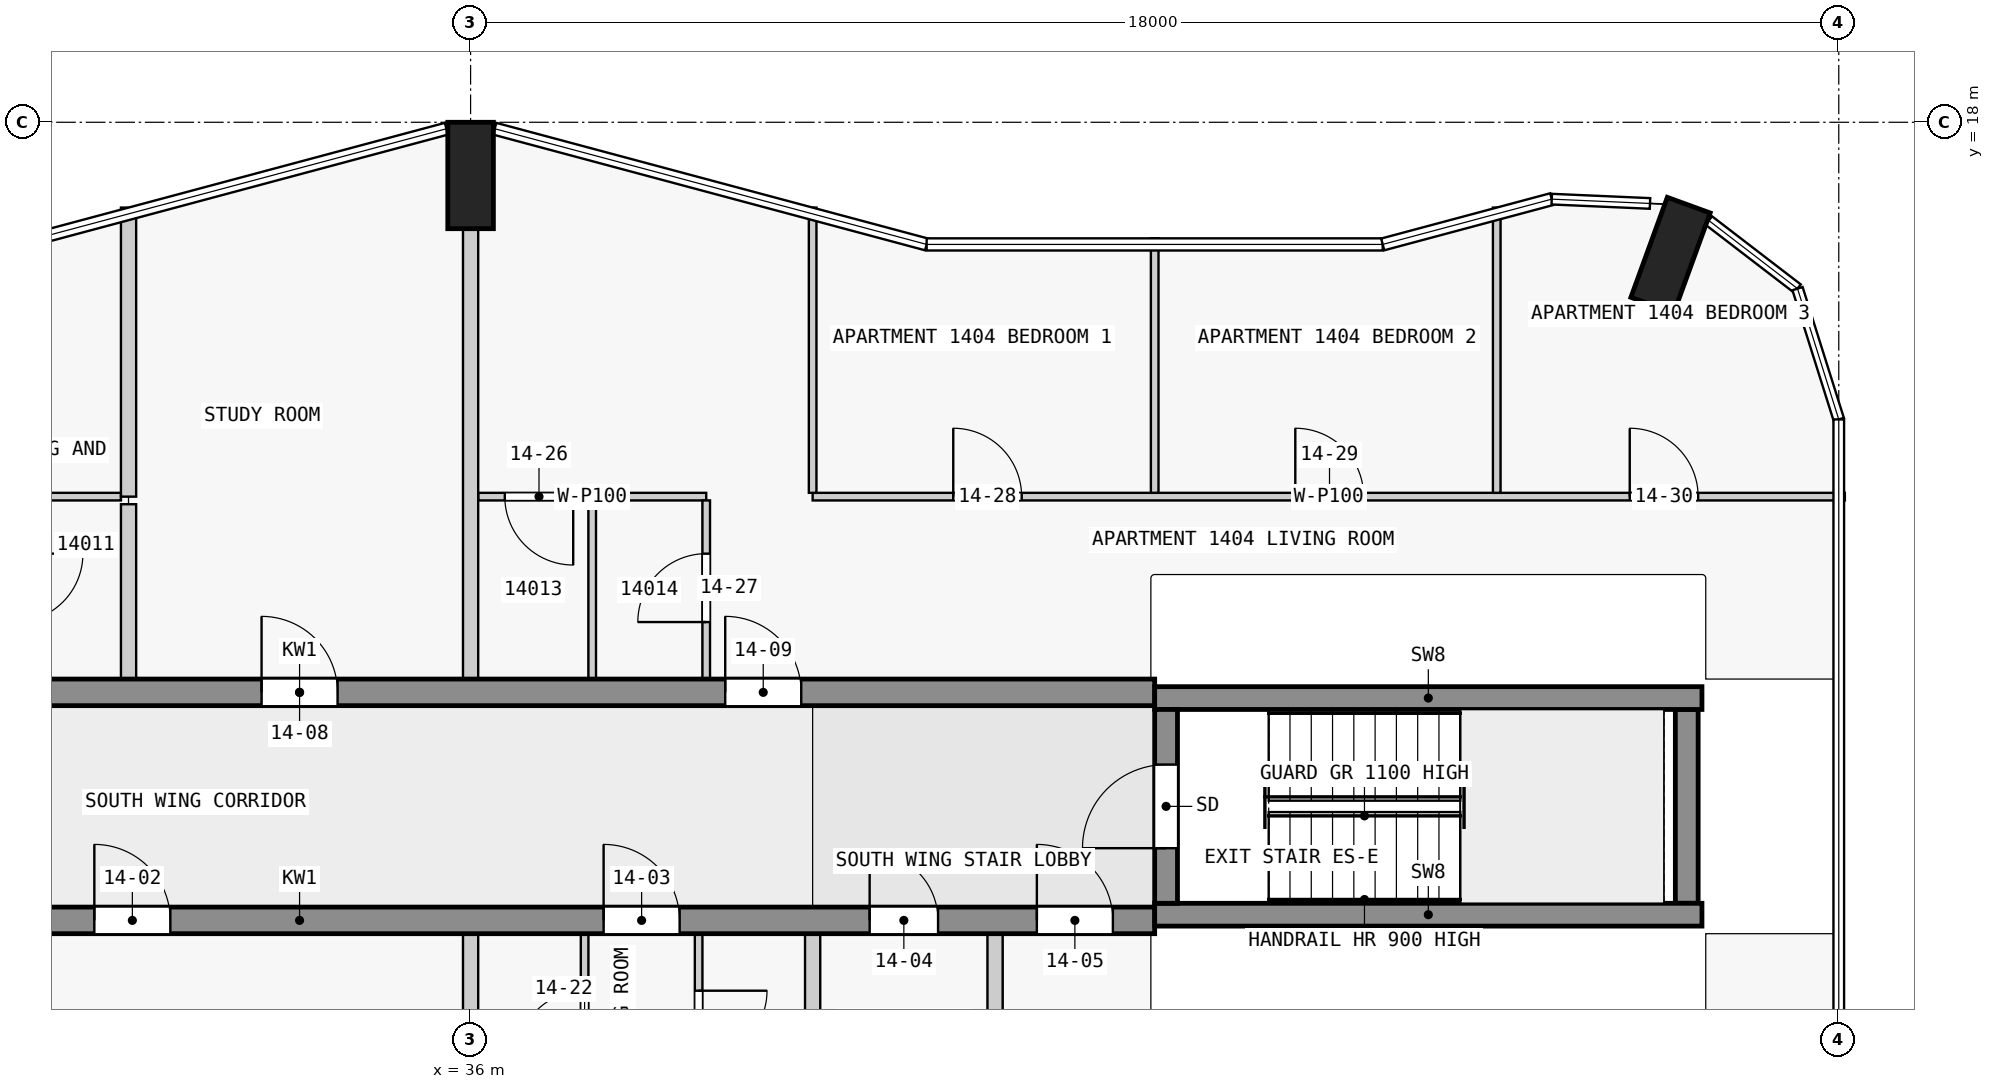
"""IFC4 building model, lengths in metres.
Left out: names, types, materials, properties, quantities, classifications, styles, units other than length and angle.
Written with IfcOpenShell. Run it as: python <this file> out.ifc"""

import sys

from ifc_helpers import new_model, si_unit, direction, frame, frame_2d, origin, origin_2d, place, context, subcontext, project, spatial, rectangle, extrude, element, fill, save


model = new_model("IFC4")
c1 = context("Model", 3, precision=1e-05, world=origin(), true_north=direction((0.0, 1.0)))
c2 = subcontext(c1, "Body", "Model", "MODEL_VIEW")
j1 = project(units=[si_unit("LENGTHUNIT", "METRE"), si_unit("PLANEANGLEUNIT", "RADIAN")], contexts=[c1])
p1 = place(None, origin())
s1 = spatial("IfcSite", under=j1, at=p1, CompositionType="ELEMENT")
p2 = place(p1, origin())
s2 = spatial("IfcBuilding", under=s1, at=p2, CompositionType="ELEMENT")
p3 = place(p2, frame((0.0, 0.0, 58.3)))
s3 = spatial("IfcBuildingStorey", under=s2, at=p3, CompositionType="ELEMENT", Elevation=58.3)
for number, where, z_axis, x_axis in (
    (1, (51.787, 16.252, 0.0), (0.0, 0.0, 1.0), (-0.94, 0.342, 0.0)),
    (2, (36.0, 17.3, 0.0), (0.0, 0.0, 1.0), (1.0, 0.0, 0.0)),
):
    element("IfcColumn", number, at=place(p3, frame(where, z_axis=z_axis, x_axis=x_axis)), inside=s3, PredefinedType="COLUMN", context=c2, shape_type="SweptSolid", body=[
        extrude(rectangle(XDim=0.6, YDim=1.4, at=origin_2d()), origin(), (0.0, 0.0, 1.0), 3.5),
    ])
p4 = place(p3, frame((45.15, 7.725, 0.0), z_axis=(0.0, 0.0, 1.0), x_axis=(0.0, 1.0, 0.0)))
e3 = element("IfcWall", 3, at=p4, inside=s3, PredefinedType="SHEAR", context=c2, shape_type="SweptSolid", body=[
    extrude(rectangle(XDim=2.55, YDim=0.3, at=frame_2d((1.275, 0.0))), origin(), (0.0, 0.0, 1.0), 3.5),
])
p5 = place(p4, frame((0.725, 0.0, 0.0)))
e4 = element("IfcOpeningElement", 4, at=p5, cuts=e3, PredefinedType="OPENING", context=c2, shape_type="SweptSolid", body=[
    extrude(rectangle(XDim=1.1, YDim=2.1, at=frame_2d((0.55, 1.05))), frame((0.0, 0.16, 0.0), z_axis=(0.0, -1.0, 0.0), x_axis=(1.0, 0.0, 0.0)), (0.0, 0.0, 1.0), 0.32),
])
p6 = place(p3, frame((52.0, 7.725, 0.0), z_axis=(0.0, 0.0, 1.0), x_axis=(0.0, 1.0, 0.0)))
e5 = element("IfcWall", 5, at=p6, inside=s3, PredefinedType="SHEAR", context=c2, shape_type="SweptSolid", body=[
    extrude(rectangle(XDim=2.55, YDim=0.3, at=frame_2d((1.275, 0.0))), origin(), (0.0, 0.0, 1.0), 3.5),
])
for number, where, z_axis, x_axis in (
    (6, (45.0, 7.575, 0.0), (0.0, 0.0, 1.0), (1.0, 0.0, 0.0)),
    (7, (45.0, 10.425, 0.0), (0.0, 0.0, 1.0), (1.0, 0.0, 0.0)),
):
    element("IfcWall", number, at=place(p3, frame(where, z_axis=z_axis, x_axis=x_axis)), inside=s3, PredefinedType="SHEAR", context=c2, shape_type="SweptSolid", body=[
        extrude(rectangle(XDim=7.2, YDim=0.3, at=frame_2d((3.6, 0.0))), origin(), (0.0, 0.0, 1.0), 3.5),
    ])
p7 = place(p3, frame((22.5, 7.5, 0.0), z_axis=(0.0, 0.0, 1.0), x_axis=(1.0, 0.0, 0.0)))
e8 = element("IfcWall", 8, at=p7, inside=s3, PredefinedType="SHEAR", context=c2, shape_type="SweptSolid", body=[
    extrude(rectangle(XDim=22.5, YDim=0.35, at=frame_2d((11.25, 0.0))), origin(), (0.0, 0.0, 1.0), 3.25),
])
p8 = place(p7, frame((1.75, 0.0, 0.0)))
e9 = element("IfcOpeningElement", 9, at=p8, cuts=e8, PredefinedType="OPENING", context=c2, shape_type="SweptSolid", body=[
    extrude(rectangle(XDim=1.0, YDim=2.1, at=frame_2d((0.5, 1.05))), frame((0.0, 0.185, 0.0), z_axis=(0.0, -1.0, 0.0), x_axis=(1.0, 0.0, 0.0)), (0.0, 0.0, 1.0), 0.37),
])
p9 = place(p7, frame((8.55, 0.0, 0.0)))
e10 = element("IfcOpeningElement", 10, at=p9, cuts=e8, PredefinedType="OPENING", context=c2, shape_type="SweptSolid", body=[
    extrude(rectangle(XDim=1.0, YDim=2.1, at=frame_2d((0.5, 1.05))), frame((0.0, 0.185, 0.0), z_axis=(0.0, -1.0, 0.0), x_axis=(1.0, 0.0, 0.0)), (0.0, 0.0, 1.0), 0.37),
])
p10 = place(p7, frame((15.25, 0.0, 0.0)))
e11 = element("IfcOpeningElement", 11, at=p10, cuts=e8, PredefinedType="OPENING", context=c2, shape_type="SweptSolid", body=[
    extrude(rectangle(XDim=1.0, YDim=2.1, at=frame_2d((0.5, 1.05))), frame((0.0, 0.185, 0.0), z_axis=(0.0, -1.0, 0.0), x_axis=(1.0, 0.0, 0.0)), (0.0, 0.0, 1.0), 0.37),
])
p11 = place(p7, frame((18.75, 0.0, 0.0)))
e12 = element("IfcOpeningElement", 12, at=p11, cuts=e8, PredefinedType="OPENING", context=c2, shape_type="SweptSolid", body=[
    extrude(rectangle(XDim=0.9, YDim=2.1, at=frame_2d((0.45, 1.05))), frame((0.0, 0.185, 0.0), z_axis=(0.0, -1.0, 0.0), x_axis=(1.0, 0.0, 0.0)), (0.0, 0.0, 1.0), 0.37),
])
p12 = place(p7, frame((20.95, 0.0, 0.0)))
e13 = element("IfcOpeningElement", 13, at=p12, cuts=e8, PredefinedType="OPENING", context=c2, shape_type="SweptSolid", body=[
    extrude(rectangle(XDim=1.0, YDim=2.1, at=frame_2d((0.5, 1.05))), frame((0.0, 0.185, 0.0), z_axis=(0.0, -1.0, 0.0), x_axis=(1.0, 0.0, 0.0)), (0.0, 0.0, 1.0), 0.37),
])
p13 = place(p3, frame((22.5, 10.5, 0.0), z_axis=(0.0, 0.0, 1.0), x_axis=(1.0, 0.0, 0.0)))
e14 = element("IfcWall", 14, at=p13, inside=s3, PredefinedType="SHEAR", context=c2, shape_type="SweptSolid", body=[
    extrude(rectangle(XDim=22.5, YDim=0.35, at=frame_2d((11.25, 0.0))), origin(), (0.0, 0.0, 1.0), 3.25),
])
p14 = place(p13, frame((1.75, 0.0, 0.0)))
e15 = element("IfcOpeningElement", 15, at=p14, cuts=e14, PredefinedType="OPENING", context=c2, shape_type="SweptSolid", body=[
    extrude(rectangle(XDim=1.0, YDim=2.1, at=frame_2d((0.5, 1.05))), frame((0.0, 0.185, 0.0), z_axis=(0.0, -1.0, 0.0), x_axis=(1.0, 0.0, 0.0)), (0.0, 0.0, 1.0), 0.37),
])
p15 = place(p13, frame((6.25, 0.0, 0.0)))
e16 = element("IfcOpeningElement", 16, at=p15, cuts=e14, PredefinedType="OPENING", context=c2, shape_type="SweptSolid", body=[
    extrude(rectangle(XDim=1.0, YDim=2.1, at=frame_2d((0.5, 1.05))), frame((0.0, 0.185, 0.0), z_axis=(0.0, -1.0, 0.0), x_axis=(1.0, 0.0, 0.0)), (0.0, 0.0, 1.0), 0.37),
])
p16 = place(p13, frame((10.75, 0.0, 0.0)))
e17 = element("IfcOpeningElement", 17, at=p16, cuts=e14, PredefinedType="OPENING", context=c2, shape_type="SweptSolid", body=[
    extrude(rectangle(XDim=1.0, YDim=2.1, at=frame_2d((0.5, 1.05))), frame((0.0, 0.185, 0.0), z_axis=(0.0, -1.0, 0.0), x_axis=(1.0, 0.0, 0.0)), (0.0, 0.0, 1.0), 0.37),
])
p17 = place(p13, frame((16.85, 0.0, 0.0)))
e18 = element("IfcOpeningElement", 18, at=p17, cuts=e14, PredefinedType="OPENING", context=c2, shape_type="SweptSolid", body=[
    extrude(rectangle(XDim=1.0, YDim=2.1, at=frame_2d((0.5, 1.05))), frame((0.0, 0.185, 0.0), z_axis=(0.0, -1.0, 0.0), x_axis=(1.0, 0.0, 0.0)), (0.0, 0.0, 1.0), 0.37),
])
p18 = place(p3, frame((31.4, 13.075, 0.0), z_axis=(0.0, 0.0, 1.0), x_axis=(-1.0, 0.0, 0.0)))
e19 = element("IfcWall", 19, at=p18, inside=s3, PredefinedType="PARTITIONING", context=c2, shape_type="SweptSolid", body=[
    extrude(rectangle(XDim=1.35, YDim=0.1, at=frame_2d((0.675, 0.0))), origin(), (0.0, 0.0, 1.0), 3.25),
])
p19 = place(p3, frame((39.1, 13.075, 0.0), z_axis=(0.0, 0.0, 1.0), x_axis=(-1.0, 0.0, 0.0)))
e20 = element("IfcWall", 20, at=p19, inside=s3, PredefinedType="PARTITIONING", context=c2, shape_type="SweptSolid", body=[
    extrude(rectangle(XDim=3.0, YDim=0.1, at=frame_2d((1.5, 0.0))), origin(), (0.0, 0.0, 1.0), 3.25),
])
p20 = place(p19, frame((1.75, 0.0, 0.0)))
e21 = element("IfcOpeningElement", 21, at=p20, cuts=e20, PredefinedType="OPENING", context=c2, shape_type="SweptSolid", body=[
    extrude(rectangle(XDim=0.9, YDim=2.1, at=frame_2d((0.45, 1.05))), frame((0.0, 0.06, 0.0), z_axis=(0.0, -1.0, 0.0), x_axis=(1.0, 0.0, 0.0)), (0.0, 0.0, 1.0), 0.12),
])
p21 = place(p3, frame((40.5, 13.075, 0.0), z_axis=(0.0, 0.0, 1.0), x_axis=(1.0, 0.0, 0.0)))
e22 = element("IfcWall", 22, at=p21, inside=s3, PredefinedType="PARTITIONING", context=c2, shape_type="SweptSolid", body=[
    extrude(rectangle(XDim=13.58, YDim=0.1, at=frame_2d((6.79, 0.0))), origin(), (0.0, 0.0, 1.0), 3.25),
])
p22 = place(p21, frame((1.85, 0.0, 0.0)))
e23 = element("IfcOpeningElement", 23, at=p22, cuts=e22, PredefinedType="OPENING", context=c2, shape_type="SweptSolid", body=[
    extrude(rectangle(XDim=0.9, YDim=2.1, at=frame_2d((0.45, 1.05))), frame((0.0, 0.06, 0.0), z_axis=(0.0, -1.0, 0.0), x_axis=(1.0, 0.0, 0.0)), (0.0, 0.0, 1.0), 0.12),
])
p23 = place(p21, frame((6.35, 0.0, 0.0)))
e24 = element("IfcOpeningElement", 24, at=p23, cuts=e22, PredefinedType="OPENING", context=c2, shape_type="SweptSolid", body=[
    extrude(rectangle(XDim=0.9, YDim=2.1, at=frame_2d((0.45, 1.05))), frame((0.0, 0.06, 0.0), z_axis=(0.0, -1.0, 0.0), x_axis=(1.0, 0.0, 0.0)), (0.0, 0.0, 1.0), 0.12),
])
p24 = place(p21, frame((10.75, 0.0, 0.0)))
e25 = element("IfcOpeningElement", 25, at=p24, cuts=e22, PredefinedType="OPENING", context=c2, shape_type="SweptSolid", body=[
    extrude(rectangle(XDim=0.9, YDim=2.1, at=frame_2d((0.45, 1.05))), frame((0.0, 0.06, 0.0), z_axis=(0.0, -1.0, 0.0), x_axis=(1.0, 0.0, 0.0)), (0.0, 0.0, 1.0), 0.12),
])
p25 = place(p3, frame((31.5, 16.878, 0.0), z_axis=(0.0, 0.0, 1.0), x_axis=(0.0, -1.0, 0.0)))
e26 = element("IfcWall", 26, at=p25, inside=s3, PredefinedType="PARTITIONING", context=c2, shape_type="SweptSolid", body=[
    extrude(rectangle(XDim=3.803, YDim=0.2, at=frame_2d((1.901, 0.0))), origin(), (0.0, 0.0, 1.0), 3.25),
])
p26 = place(p3, frame((31.5, 10.675, 0.0), z_axis=(0.0, 0.0, 1.0), x_axis=(0.0, 1.0, 0.0)))
e27 = element("IfcWall", 27, at=p26, inside=s3, PredefinedType="PARTITIONING", context=c2, shape_type="SweptSolid", body=[
    extrude(rectangle(XDim=2.3, YDim=0.2, at=frame_2d((1.15, 0.0))), origin(), (0.0, 0.0, 1.0), 3.25),
])
for number, where, z_axis, x_axis in (
    (28, (36.0, 1.4, 0.0), (0.0, 0.0, 1.0), (0.0, 1.0, 0.0)),
    (29, (36.0, 10.675, 0.0), (0.0, 0.0, 1.0), (0.0, 1.0, 0.0)),
):
    element("IfcWall", number, at=place(p3, frame(where, z_axis=z_axis, x_axis=x_axis)), inside=s3, PredefinedType="PARTITIONING", context=c2, shape_type="SweptSolid", body=[
        extrude(rectangle(XDim=5.925, YDim=0.2, at=frame_2d((2.962, 0.0))), origin(), (0.0, 0.0, 1.0), 3.25),
    ])
p27 = place(p3, frame((37.5, 4.925, 0.0), z_axis=(0.0, 0.0, 1.0), x_axis=(0.0, 1.0, 0.0)))
e30 = element("IfcWall", 30, at=p27, inside=s3, PredefinedType="PARTITIONING", context=c2, shape_type="SweptSolid", body=[
    extrude(rectangle(XDim=2.4, YDim=0.1, at=frame_2d((1.2, 0.0))), origin(), (0.0, 0.0, 1.0), 3.25),
])
p28 = place(p27, frame((0.75, 0.0, 0.0)))
e31 = element("IfcOpeningElement", 31, at=p28, cuts=e30, PredefinedType="OPENING", context=c2, shape_type="SweptSolid", body=[
    extrude(rectangle(XDim=0.9, YDim=2.1, at=frame_2d((0.45, 1.05))), frame((0.0, 0.06, 0.0), z_axis=(0.0, -1.0, 0.0), x_axis=(1.0, 0.0, 0.0)), (0.0, 0.0, 1.0), 0.12),
])
p29 = place(p3, frame((37.6, 10.675, 0.0), z_axis=(0.0, 0.0, 1.0), x_axis=(0.0, 1.0, 0.0)))
e32 = element("IfcWall", 32, at=p29, inside=s3, PredefinedType="PARTITIONING", context=c2, shape_type="SweptSolid", body=[
    extrude(rectangle(XDim=2.35, YDim=0.1, at=frame_2d((1.175, 0.0))), origin(), (0.0, 0.0, 1.0), 3.25),
])
p30 = place(p3, frame((39.0, 7.325, 0.0), z_axis=(0.0, 0.0, 1.0), x_axis=(0.0, -1.0, 0.0)))
e33 = element("IfcWall", 33, at=p30, inside=s3, PredefinedType="PARTITIONING", context=c2, shape_type="SweptSolid", body=[
    extrude(rectangle(XDim=2.4, YDim=0.1, at=frame_2d((1.2, 0.0))), origin(), (0.0, 0.0, 1.0), 3.25),
])
p31 = place(p30, frame((0.75, 0.0, 0.0)))
e34 = element("IfcOpeningElement", 34, at=p31, cuts=e33, PredefinedType="OPENING", context=c2, shape_type="SweptSolid", body=[
    extrude(rectangle(XDim=0.9, YDim=2.1, at=frame_2d((0.45, 1.05))), frame((0.0, 0.06, 0.0), z_axis=(0.0, -1.0, 0.0), x_axis=(1.0, 0.0, 0.0)), (0.0, 0.0, 1.0), 0.12),
])
p32 = place(p3, frame((39.1, 10.675, 0.0), z_axis=(0.0, 0.0, 1.0), x_axis=(0.0, 1.0, 0.0)))
e35 = element("IfcWall", 35, at=p32, inside=s3, PredefinedType="PARTITIONING", context=c2, shape_type="SweptSolid", body=[
    extrude(rectangle(XDim=2.35, YDim=0.1, at=frame_2d((1.175, 0.0))), origin(), (0.0, 0.0, 1.0), 3.25),
])
p33 = place(p32, frame((0.75, 0.0, 0.0)))
e36 = element("IfcOpeningElement", 36, at=p33, cuts=e35, PredefinedType="OPENING", context=c2, shape_type="SweptSolid", body=[
    extrude(rectangle(XDim=0.9, YDim=2.1, at=frame_2d((0.45, 1.05))), frame((0.0, 0.06, 0.0), z_axis=(0.0, -1.0, 0.0), x_axis=(1.0, 0.0, 0.0)), (0.0, 0.0, 1.0), 0.12),
])
p34 = place(p3, frame((40.5, 16.878, 0.0), z_axis=(0.0, 0.0, 1.0), x_axis=(0.0, -1.0, 0.0)))
e37 = element("IfcWall", 37, at=p34, inside=s3, PredefinedType="PARTITIONING", context=c2, shape_type="SweptSolid", body=[
    extrude(rectangle(XDim=3.753, YDim=0.1, at=frame_2d((1.876, 0.0))), origin(), (0.0, 0.0, 1.0), 3.25),
])
for number, where, z_axis, x_axis in (
    (38, (40.5, 5.025, 0.0), (0.0, 0.0, 1.0), (0.0, 1.0, 0.0)),
    (39, (42.9, 5.025, 0.0), (0.0, 0.0, 1.0), (0.0, 1.0, 0.0)),
):
    element("IfcWall", number, at=place(p3, frame(where, z_axis=z_axis, x_axis=x_axis)), inside=s3, PredefinedType="PARTITIONING", context=c2, shape_type="SweptSolid", body=[
        extrude(rectangle(XDim=2.3, YDim=0.2, at=frame_2d((1.15, 0.0))), origin(), (0.0, 0.0, 1.0), 3.25),
    ])
p35 = place(p3, frame((45.0, 13.125, 0.0), z_axis=(0.0, 0.0, 1.0), x_axis=(0.0, 1.0, 0.0)))
e40 = element("IfcWall", 40, at=p35, inside=s3, PredefinedType="PARTITIONING", context=c2, shape_type="SweptSolid", body=[
    extrude(rectangle(XDim=3.348, YDim=0.1, at=frame_2d((1.674, 0.0))), origin(), (0.0, 0.0, 1.0), 3.25),
])
p36 = place(p3, frame((49.5, 13.125, 0.0), z_axis=(0.0, 0.0, 1.0), x_axis=(0.0, 1.0, 0.0)))
e41 = element("IfcWall", 41, at=p36, inside=s3, PredefinedType="PARTITIONING", context=c2, shape_type="SweptSolid", body=[
    extrude(rectangle(XDim=3.753, YDim=0.1, at=frame_2d((1.876, 0.0))), origin(), (0.0, 0.0, 1.0), 3.25),
])
p37 = place(p5, origin())
e42 = element("IfcDoor", 42, at=p37, inside=s3, OperationType="SINGLE_SWING_LEFT", PredefinedType="DOOR", context=c2, shape_type="SweptSolid", body=[
    extrude(rectangle(XDim=1.1, YDim=2.1, at=frame_2d((0.55, 1.05))), frame((0.0, 0.025, 0.0), z_axis=(0.0, -1.0, 0.0), x_axis=(1.0, 0.0, 0.0)), (0.0, 0.0, 1.0), 0.05),
])
fill(e4, e42)
p38 = place(p9, origin())
e43 = element("IfcDoor", 43, at=p38, inside=s3, OperationType="SINGLE_SWING_LEFT", PredefinedType="DOOR", context=c2, shape_type="SweptSolid", body=[
    extrude(rectangle(XDim=1.0, YDim=2.1, at=frame_2d((0.5, 1.05))), frame((0.0, 0.025, 0.0), z_axis=(0.0, -1.0, 0.0), x_axis=(1.0, 0.0, 0.0)), (0.0, 0.0, 1.0), 0.05),
])
fill(e10, e43)
p39 = place(p10, origin())
e44 = element("IfcDoor", 44, at=p39, inside=s3, OperationType="SINGLE_SWING_RIGHT", PredefinedType="DOOR", context=c2, shape_type="SweptSolid", body=[
    extrude(rectangle(XDim=1.0, YDim=2.1, at=frame_2d((0.5, 1.05))), frame((0.0, 0.025, 0.0), z_axis=(0.0, -1.0, 0.0), x_axis=(1.0, 0.0, 0.0)), (0.0, 0.0, 1.0), 0.05),
])
fill(e11, e44)
p40 = place(p11, origin())
e45 = element("IfcDoor", 45, at=p40, inside=s3, OperationType="SINGLE_SWING_RIGHT", PredefinedType="DOOR", context=c2, shape_type="SweptSolid", body=[
    extrude(rectangle(XDim=0.9, YDim=2.1, at=frame_2d((0.45, 1.05))), frame((0.0, 0.025, 0.0), z_axis=(0.0, -1.0, 0.0), x_axis=(1.0, 0.0, 0.0)), (0.0, 0.0, 1.0), 0.05),
])
fill(e12, e45)
p41 = place(p12, origin())
e46 = element("IfcDoor", 46, at=p41, inside=s3, OperationType="SINGLE_SWING_RIGHT", PredefinedType="DOOR", context=c2, shape_type="SweptSolid", body=[
    extrude(rectangle(XDim=1.0, YDim=2.1, at=frame_2d((0.5, 1.05))), frame((0.0, 0.025, 0.0), z_axis=(0.0, -1.0, 0.0), x_axis=(1.0, 0.0, 0.0)), (0.0, 0.0, 1.0), 0.05),
])
fill(e13, e46)
p42 = place(p16, origin())
e47 = element("IfcDoor", 47, at=p42, inside=s3, OperationType="SINGLE_SWING_LEFT", PredefinedType="DOOR", context=c2, shape_type="SweptSolid", body=[
    extrude(rectangle(XDim=1.0, YDim=2.1, at=frame_2d((0.5, 1.05))), frame((0.0, 0.025, 0.0), z_axis=(0.0, -1.0, 0.0), x_axis=(1.0, 0.0, 0.0)), (0.0, 0.0, 1.0), 0.05),
])
fill(e17, e47)
p43 = place(p17, origin())
e48 = element("IfcDoor", 48, at=p43, inside=s3, OperationType="SINGLE_SWING_RIGHT", PredefinedType="DOOR", context=c2, shape_type="SweptSolid", body=[
    extrude(rectangle(XDim=1.0, YDim=2.1, at=frame_2d((0.5, 1.05))), frame((0.0, 0.025, 0.0), z_axis=(0.0, -1.0, 0.0), x_axis=(1.0, 0.0, 0.0)), (0.0, 0.0, 1.0), 0.05),
])
fill(e18, e48)
p44 = place(p28, origin())
e49 = element("IfcDoor", 49, at=p44, inside=s3, OperationType="SINGLE_SWING_LEFT", PredefinedType="DOOR", context=c2, shape_type="SweptSolid", body=[
    extrude(rectangle(XDim=0.9, YDim=2.1, at=frame_2d((0.45, 1.05))), frame((0.0, 0.025, 0.0), z_axis=(0.0, -1.0, 0.0), x_axis=(1.0, 0.0, 0.0)), (0.0, 0.0, 1.0), 0.05),
])
fill(e31, e49)
p45 = place(p31, origin())
e50 = element("IfcDoor", 50, at=p45, inside=s3, OperationType="SINGLE_SWING_LEFT", PredefinedType="DOOR", context=c2, shape_type="SweptSolid", body=[
    extrude(rectangle(XDim=0.9, YDim=2.1, at=frame_2d((0.45, 1.05))), frame((0.0, 0.025, 0.0), z_axis=(0.0, -1.0, 0.0), x_axis=(1.0, 0.0, 0.0)), (0.0, 0.0, 1.0), 0.05),
])
fill(e34, e50)
p46 = place(p20, origin())
e51 = element("IfcDoor", 51, at=p46, inside=s3, OperationType="SINGLE_SWING_RIGHT", PredefinedType="DOOR", context=c2, shape_type="SweptSolid", body=[
    extrude(rectangle(XDim=0.9, YDim=2.1, at=frame_2d((0.45, 1.05))), frame((0.0, 0.025, 0.0), z_axis=(0.0, -1.0, 0.0), x_axis=(1.0, 0.0, 0.0)), (0.0, 0.0, 1.0), 0.05),
])
fill(e21, e51)
p47 = place(p33, origin())
e52 = element("IfcDoor", 52, at=p47, inside=s3, OperationType="SINGLE_SWING_RIGHT", PredefinedType="DOOR", context=c2, shape_type="SweptSolid", body=[
    extrude(rectangle(XDim=0.9, YDim=2.1, at=frame_2d((0.45, 1.05))), frame((0.0, 0.025, 0.0), z_axis=(0.0, -1.0, 0.0), x_axis=(1.0, 0.0, 0.0)), (0.0, 0.0, 1.0), 0.05),
])
fill(e36, e52)
p48 = place(p22, origin())
e53 = element("IfcDoor", 53, at=p48, inside=s3, OperationType="SINGLE_SWING_LEFT", PredefinedType="DOOR", context=c2, shape_type="SweptSolid", body=[
    extrude(rectangle(XDim=0.9, YDim=2.1, at=frame_2d((0.45, 1.05))), frame((0.0, 0.025, 0.0), z_axis=(0.0, -1.0, 0.0), x_axis=(1.0, 0.0, 0.0)), (0.0, 0.0, 1.0), 0.05),
])
fill(e23, e53)
p49 = place(p23, origin())
e54 = element("IfcDoor", 54, at=p49, inside=s3, OperationType="SINGLE_SWING_RIGHT", PredefinedType="DOOR", context=c2, shape_type="SweptSolid", body=[
    extrude(rectangle(XDim=0.9, YDim=2.1, at=frame_2d((0.45, 1.05))), frame((0.0, 0.025, 0.0), z_axis=(0.0, -1.0, 0.0), x_axis=(1.0, 0.0, 0.0)), (0.0, 0.0, 1.0), 0.05),
])
fill(e24, e54)
p50 = place(p24, origin())
e55 = element("IfcDoor", 55, at=p50, inside=s3, OperationType="SINGLE_SWING_RIGHT", PredefinedType="DOOR", context=c2, shape_type="SweptSolid", body=[
    extrude(rectangle(XDim=0.9, YDim=2.1, at=frame_2d((0.45, 1.05))), frame((0.0, 0.025, 0.0), z_axis=(0.0, -1.0, 0.0), x_axis=(1.0, 0.0, 0.0)), (0.0, 0.0, 1.0), 0.05),
])
fill(e25, e55)
save(model, sys.argv[1])
